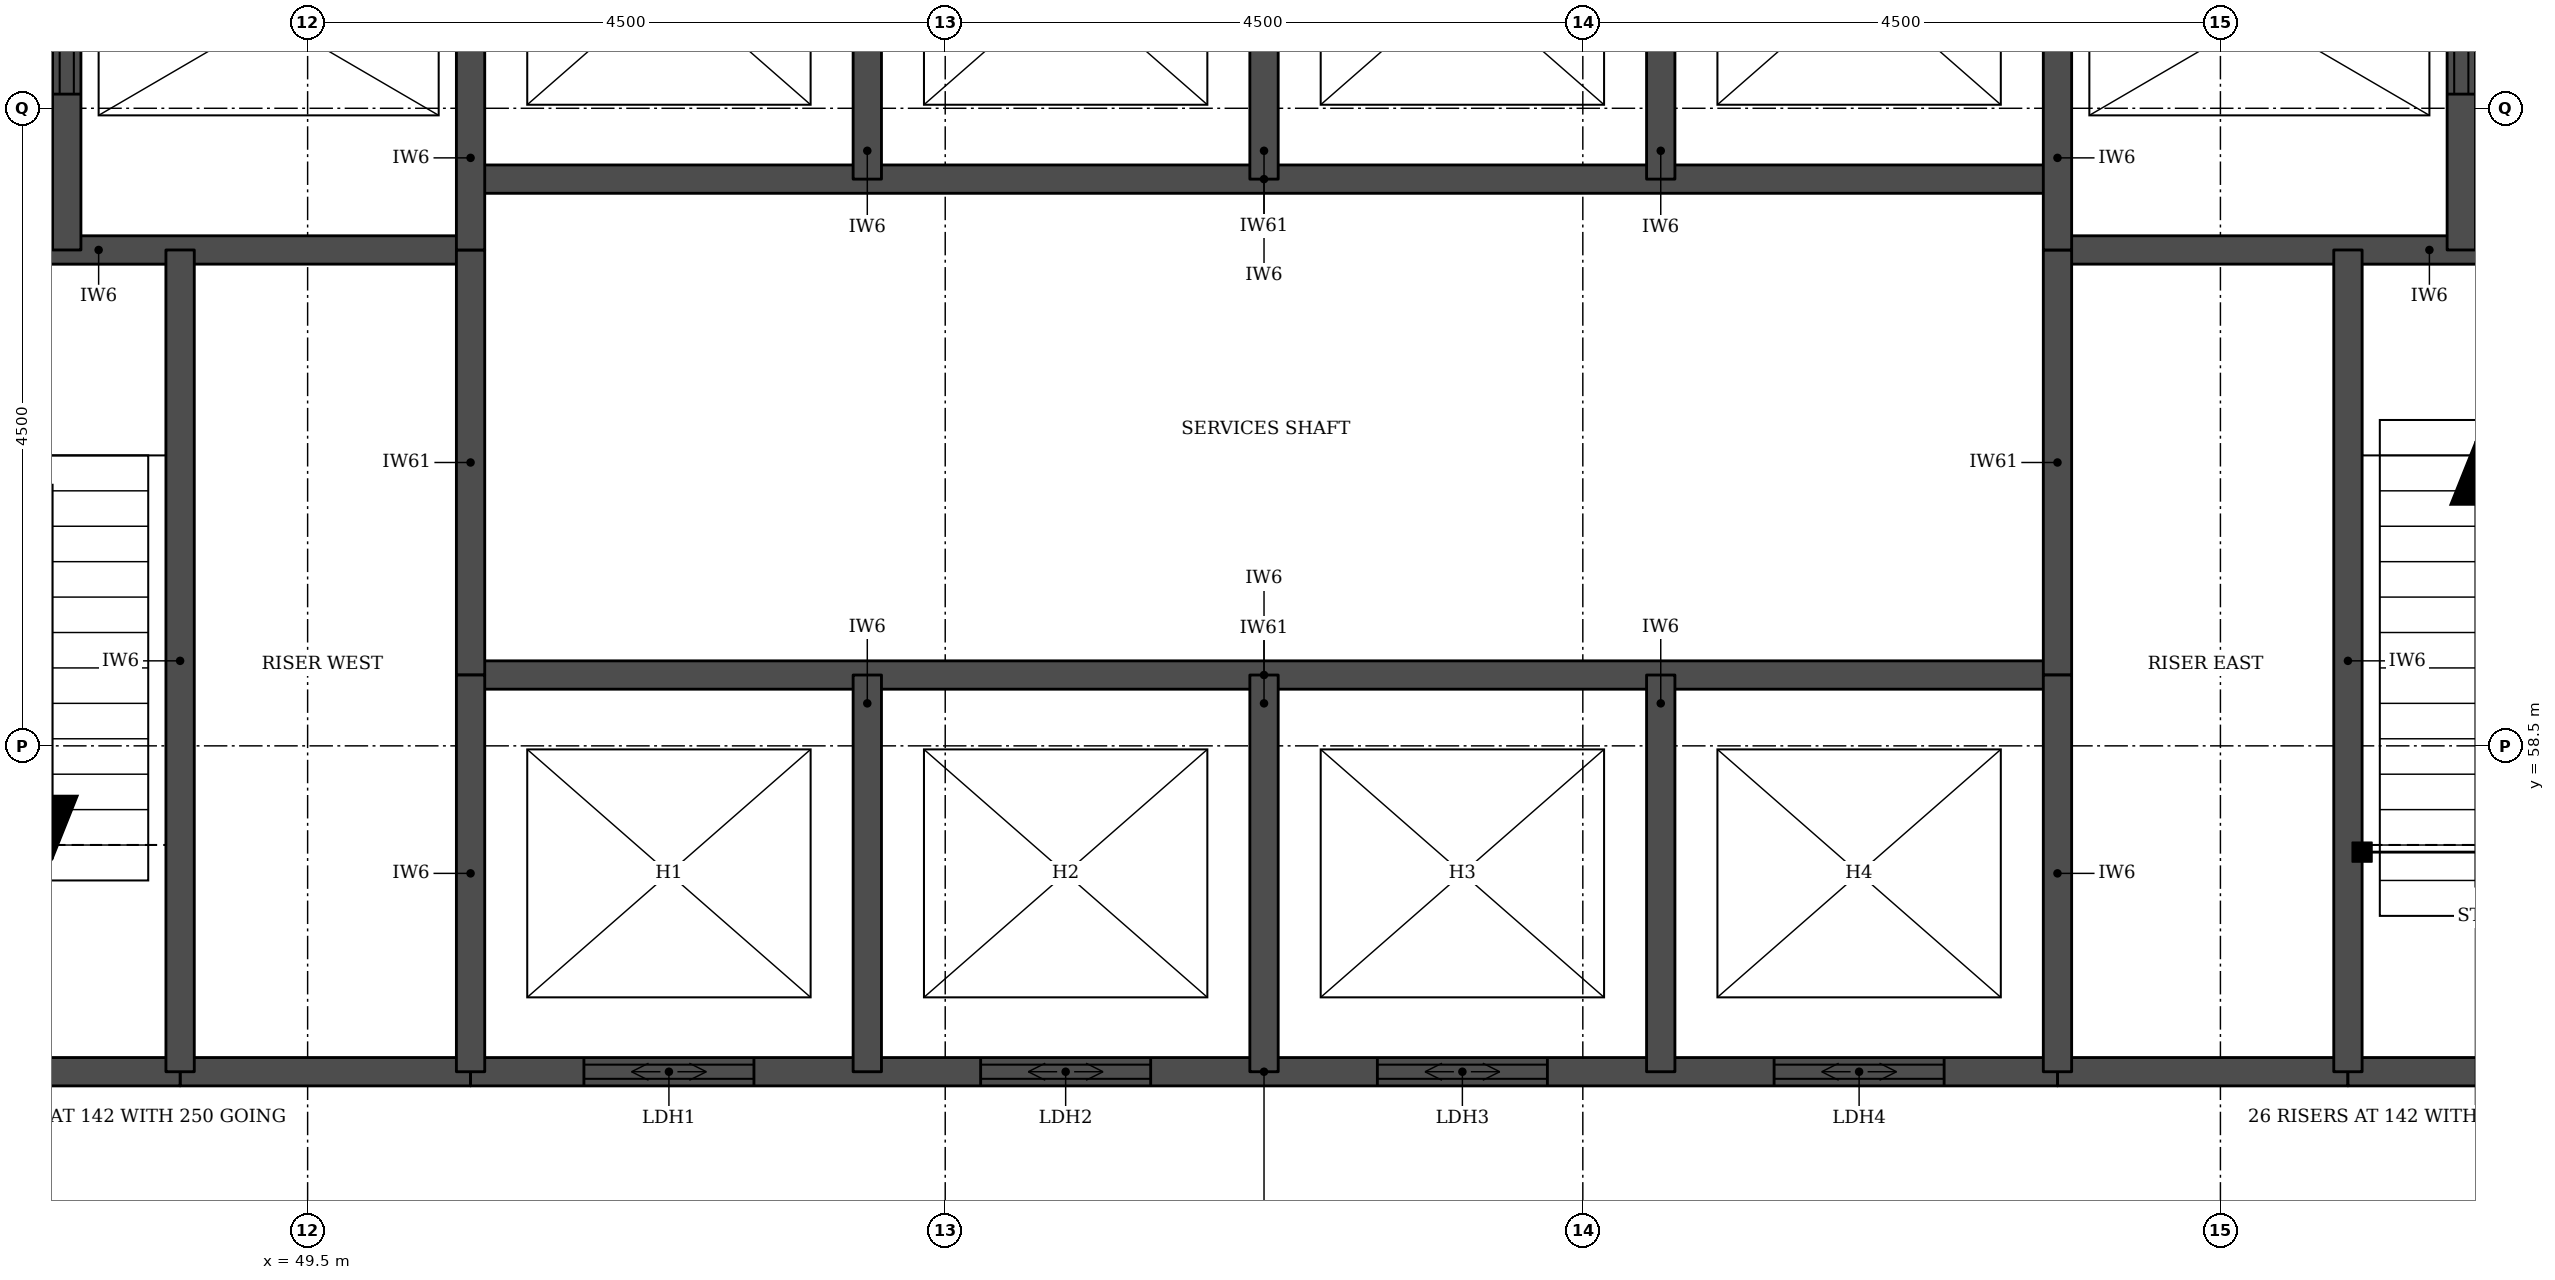
"""IFC4 building model, lengths in metres.
Left out: names, types, materials, properties, quantities, classifications, styles, units other than length and angle.
Written with IfcOpenShell. Run it as: python <this file> out.ifc"""

import sys

from ifc_helpers import new_model, si_unit, direction, frame, frame_2d, origin, place, context, subcontext, project, spatial, rectangle, extrude, element, fill, save


model = new_model("IFC4")
c1 = context("Model", 3, precision=1e-05, world=origin(), true_north=direction((0.0, 1.0)))
c2 = subcontext(c1, "Body", "Model", "MODEL_VIEW")
j1 = project(units=[si_unit("LENGTHUNIT", "METRE"), si_unit("PLANEANGLEUNIT", "RADIAN")], contexts=[c1])
p1 = place(None, origin())
s1 = spatial("IfcSite", under=j1, at=p1, CompositionType="ELEMENT")
p2 = place(p1, origin())
s2 = spatial("IfcBuilding", under=s1, at=p2, CompositionType="ELEMENT")
p3 = place(p2, frame((0.0, 0.0, 188.4)))
s3 = spatial("IfcBuildingStorey", under=s2, at=p3, CompositionType="ELEMENT", Elevation=188.4)
for number, where, z_axis, x_axis in (
    (1, (48.6, 56.2, 0.0), (0.0, 0.0, 1.0), (1.0, 0.0, 0.0)),
    (2, (61.85, 56.2, 0.0), (0.0, 0.0, 1.0), (1.0, 0.0, 0.0)),
):
    element("IfcWall", number, at=place(p3, frame(where, z_axis=z_axis, x_axis=x_axis)), inside=s3, PredefinedType="SOLIDWALL", context=c2, shape_type="SweptSolid", body=[
        extrude(rectangle(XDim=2.05, YDim=0.2, at=frame_2d((1.025, 0.0))), origin(), (0.0, 0.0, 1.0), 3.55),
    ])
p4 = place(p3, frame((45.4, 56.2, 0.0), z_axis=(0.0, 0.0, 1.0), x_axis=(1.0, 0.0, 0.0)))
e3 = element("IfcWall", 3, at=p4, inside=s3, PredefinedType="SOLIDWALL", context=c2, shape_type="SweptSolid", body=[
    extrude(rectangle(XDim=3.2, YDim=0.2, at=frame_2d((1.6, 0.0))), origin(), (0.0, 0.0, 1.0), 3.55),
])
p5 = place(p3, frame((50.65, 56.2, 0.0), z_axis=(0.0, 0.0, 1.0), x_axis=(1.0, 0.0, 0.0)))
e4 = element("IfcWall", 4, at=p5, inside=s3, PredefinedType="SOLIDWALL", context=c2, shape_type="SweptSolid", body=[
    extrude(rectangle(XDim=11.2, YDim=0.2, at=frame_2d((5.6, 0.0))), origin(), (0.0, 0.0, 1.0), 3.55),
])
p6 = place(p5, frame((0.8, 0.0, 0.0)))
e5 = element("IfcOpeningElement", 5, at=p6, cuts=e4, PredefinedType="OPENING", context=c2, shape_type="SweptSolid", body=[
    extrude(rectangle(XDim=1.2, YDim=2.1, at=frame_2d((0.6, 1.05))), frame((0.0, 0.11, 0.0), z_axis=(0.0, -1.0, 0.0), x_axis=(1.0, 0.0, 0.0)), (0.0, 0.0, 1.0), 0.22),
])
p7 = place(p5, frame((3.6, 0.0, 0.0)))
e6 = element("IfcOpeningElement", 6, at=p7, cuts=e4, PredefinedType="OPENING", context=c2, shape_type="SweptSolid", body=[
    extrude(rectangle(XDim=1.2, YDim=2.1, at=frame_2d((0.6, 1.05))), frame((0.0, 0.11, 0.0), z_axis=(0.0, -1.0, 0.0), x_axis=(1.0, 0.0, 0.0)), (0.0, 0.0, 1.0), 0.22),
])
p8 = place(p5, frame((6.4, 0.0, 0.0)))
e7 = element("IfcOpeningElement", 7, at=p8, cuts=e4, PredefinedType="OPENING", context=c2, shape_type="SweptSolid", body=[
    extrude(rectangle(XDim=1.2, YDim=2.1, at=frame_2d((0.6, 1.05))), frame((0.0, 0.11, 0.0), z_axis=(0.0, -1.0, 0.0), x_axis=(1.0, 0.0, 0.0)), (0.0, 0.0, 1.0), 0.22),
])
p9 = place(p5, frame((9.2, 0.0, 0.0)))
e8 = element("IfcOpeningElement", 8, at=p9, cuts=e4, PredefinedType="OPENING", context=c2, shape_type="SweptSolid", body=[
    extrude(rectangle(XDim=1.2, YDim=2.1, at=frame_2d((0.6, 1.05))), frame((0.0, 0.11, 0.0), z_axis=(0.0, -1.0, 0.0), x_axis=(1.0, 0.0, 0.0)), (0.0, 0.0, 1.0), 0.22),
])
p10 = place(p3, frame((63.9, 56.2, 0.0), z_axis=(0.0, 0.0, 1.0), x_axis=(1.0, 0.0, 0.0)))
e9 = element("IfcWall", 9, at=p10, inside=s3, PredefinedType="SOLIDWALL", context=c2, shape_type="SweptSolid", body=[
    extrude(rectangle(XDim=3.2, YDim=0.2, at=frame_2d((1.6, 0.0))), origin(), (0.0, 0.0, 1.0), 3.55),
])
p11 = place(p3, frame((50.65, 59.0, 0.0), z_axis=(0.0, 0.0, 1.0), x_axis=(1.0, 0.0, 0.0)))
e10 = element("IfcWall", 10, at=p11, inside=s3, PredefinedType="SOLIDWALL", context=c2, shape_type="SweptSolid", body=[
    extrude(rectangle(XDim=11.2, YDim=0.2, at=frame_2d((5.6, 0.0))), origin(), (0.0, 0.0, 1.0), 3.7),
])
for number, where, z_axis, x_axis in (
    (11, (45.4, 62.0, 0.0), (0.0, 0.0, 1.0), (1.0, 0.0, 0.0)),
    (12, (61.85, 62.0, 0.0), (0.0, 0.0, 1.0), (1.0, 0.0, 0.0)),
):
    element("IfcWall", number, at=place(p3, frame(where, z_axis=z_axis, x_axis=x_axis)), inside=s3, PredefinedType="SOLIDWALL", context=c2, shape_type="SweptSolid", body=[
        extrude(rectangle(XDim=5.25, YDim=0.2, at=frame_2d((2.625, 0.0))), origin(), (0.0, 0.0, 1.0), 3.55),
    ])
p12 = place(p3, frame((50.65, 62.5, 0.0), z_axis=(0.0, 0.0, 1.0), x_axis=(1.0, 0.0, 0.0)))
e13 = element("IfcWall", 13, at=p12, inside=s3, PredefinedType="SOLIDWALL", context=c2, shape_type="SweptSolid", body=[
    extrude(rectangle(XDim=11.2, YDim=0.2, at=frame_2d((5.6, 0.0))), origin(), (0.0, 0.0, 1.0), 3.7),
])
p13 = place(p3, frame((47.8, 62.0, 0.0), z_axis=(0.0, 0.0, 1.0), x_axis=(0.0, 1.0, 0.0)))
e14 = element("IfcWall", 14, at=p13, inside=s3, PredefinedType="SOLIDWALL", context=c2, shape_type="SweptSolid", body=[
    extrude(rectangle(XDim=3.3, YDim=0.2, at=frame_2d((1.65, 0.0))), origin(), (0.0, 0.0, 1.0), 3.55),
])
p14 = place(p13, frame((1.1, 0.0, 0.0)))
e15 = element("IfcOpeningElement", 15, at=p14, cuts=e14, PredefinedType="OPENING", context=c2, shape_type="SweptSolid", body=[
    extrude(rectangle(XDim=1.1, YDim=2.1, at=frame_2d((0.55, 1.05))), frame((0.0, 0.11, 0.0), z_axis=(0.0, -1.0, 0.0), x_axis=(1.0, 0.0, 0.0)), (0.0, 0.0, 1.0), 0.22),
])
p15 = place(p3, frame((48.6, 56.2, 0.0), z_axis=(0.0, 0.0, 1.0), x_axis=(0.0, 1.0, 0.0)))
e16 = element("IfcWall", 16, at=p15, inside=s3, PredefinedType="SOLIDWALL", context=c2, shape_type="SweptSolid", body=[
    extrude(rectangle(XDim=5.8, YDim=0.2, at=frame_2d((2.9, 0.0))), origin(), (0.0, 0.0, 1.0), 3.55),
])
p16 = place(p3, frame((50.65, 59.0, 0.0), z_axis=(0.0, 0.0, 1.0), x_axis=(0.0, 1.0, 0.0)))
e17 = element("IfcWall", 17, at=p16, inside=s3, PredefinedType="SOLIDWALL", context=c2, shape_type="SweptSolid", body=[
    extrude(rectangle(XDim=3.0, YDim=0.2, at=frame_2d((1.5, 0.0))), origin(), (0.0, 0.0, 1.0), 3.7),
])
p17 = place(p3, frame((50.65, 56.2, 0.0), z_axis=(0.0, 0.0, 1.0), x_axis=(0.0, 1.0, 0.0)))
e18 = element("IfcWall", 18, at=p17, inside=s3, PredefinedType="SOLIDWALL", context=c2, shape_type="SweptSolid", body=[
    extrude(rectangle(XDim=2.8, YDim=0.2, at=frame_2d((1.4, 0.0))), origin(), (0.0, 0.0, 1.0), 3.55),
])
p18 = place(p3, frame((50.65, 62.0, 0.0), z_axis=(0.0, 0.0, 1.0), x_axis=(0.0, 1.0, 0.0)))
e19 = element("IfcWall", 19, at=p18, inside=s3, PredefinedType="SOLIDWALL", context=c2, shape_type="SweptSolid", body=[
    extrude(rectangle(XDim=3.3, YDim=0.2, at=frame_2d((1.65, 0.0))), origin(), (0.0, 0.0, 1.0), 3.55),
])
for number, where, z_axis, x_axis in (
    (20, (53.45, 56.2, 0.0), (0.0, 0.0, 1.0), (0.0, 1.0, 0.0)),
    (21, (53.45, 62.5, 0.0), (0.0, 0.0, 1.0), (0.0, 1.0, 0.0)),
    (22, (56.25, 56.2, 0.0), (0.0, 0.0, 1.0), (0.0, 1.0, 0.0)),
    (23, (56.25, 62.5, 0.0), (0.0, 0.0, 1.0), (0.0, 1.0, 0.0)),
    (24, (59.05, 56.2, 0.0), (0.0, 0.0, 1.0), (0.0, 1.0, 0.0)),
    (25, (59.05, 62.5, 0.0), (0.0, 0.0, 1.0), (0.0, 1.0, 0.0)),
):
    element("IfcWall", number, at=place(p3, frame(where, z_axis=z_axis, x_axis=x_axis)), inside=s3, PredefinedType="SOLIDWALL", context=c2, shape_type="SweptSolid", body=[
        extrude(rectangle(XDim=2.8, YDim=0.2, at=frame_2d((1.4, 0.0))), origin(), (0.0, 0.0, 1.0), 3.55),
    ])
p19 = place(p3, frame((61.85, 59.0, 0.0), z_axis=(0.0, 0.0, 1.0), x_axis=(0.0, 1.0, 0.0)))
e26 = element("IfcWall", 26, at=p19, inside=s3, PredefinedType="SOLIDWALL", context=c2, shape_type="SweptSolid", body=[
    extrude(rectangle(XDim=3.0, YDim=0.2, at=frame_2d((1.5, 0.0))), origin(), (0.0, 0.0, 1.0), 3.7),
])
p20 = place(p3, frame((61.85, 56.2, 0.0), z_axis=(0.0, 0.0, 1.0), x_axis=(0.0, 1.0, 0.0)))
e27 = element("IfcWall", 27, at=p20, inside=s3, PredefinedType="SOLIDWALL", context=c2, shape_type="SweptSolid", body=[
    extrude(rectangle(XDim=2.8, YDim=0.2, at=frame_2d((1.4, 0.0))), origin(), (0.0, 0.0, 1.0), 3.55),
])
p21 = place(p3, frame((61.85, 62.0, 0.0), z_axis=(0.0, 0.0, 1.0), x_axis=(0.0, 1.0, 0.0)))
e28 = element("IfcWall", 28, at=p21, inside=s3, PredefinedType="SOLIDWALL", context=c2, shape_type="SweptSolid", body=[
    extrude(rectangle(XDim=3.3, YDim=0.2, at=frame_2d((1.65, 0.0))), origin(), (0.0, 0.0, 1.0), 3.55),
])
p22 = place(p3, frame((63.9, 56.2, 0.0), z_axis=(0.0, 0.0, 1.0), x_axis=(0.0, 1.0, 0.0)))
e29 = element("IfcWall", 29, at=p22, inside=s3, PredefinedType="SOLIDWALL", context=c2, shape_type="SweptSolid", body=[
    extrude(rectangle(XDim=5.8, YDim=0.2, at=frame_2d((2.9, 0.0))), origin(), (0.0, 0.0, 1.0), 3.55),
])
p23 = place(p3, frame((64.7, 62.0, 0.0), z_axis=(0.0, 0.0, 1.0), x_axis=(0.0, 1.0, 0.0)))
e30 = element("IfcWall", 30, at=p23, inside=s3, PredefinedType="SOLIDWALL", context=c2, shape_type="SweptSolid", body=[
    extrude(rectangle(XDim=3.3, YDim=0.2, at=frame_2d((1.65, 0.0))), origin(), (0.0, 0.0, 1.0), 3.55),
])
p24 = place(p23, frame((1.1, 0.0, 0.0)))
e31 = element("IfcOpeningElement", 31, at=p24, cuts=e30, PredefinedType="OPENING", context=c2, shape_type="SweptSolid", body=[
    extrude(rectangle(XDim=1.1, YDim=2.1, at=frame_2d((0.55, 1.05))), frame((0.0, 0.11, 0.0), z_axis=(0.0, -1.0, 0.0), x_axis=(1.0, 0.0, 0.0)), (0.0, 0.0, 1.0), 0.22),
])
p25 = place(p6, origin())
e32 = element("IfcDoor", 32, at=p25, inside=s3, OperationType="DOUBLE_DOOR_SLIDING", PredefinedType="DOOR", context=c2, shape_type="SweptSolid", body=[
    extrude(rectangle(XDim=1.2, YDim=2.1, at=frame_2d((0.6, 1.05))), frame((0.0, 0.025, 0.0), z_axis=(0.0, -1.0, 0.0), x_axis=(1.0, 0.0, 0.0)), (0.0, 0.0, 1.0), 0.05),
])
fill(e5, e32)
p26 = place(p7, origin())
e33 = element("IfcDoor", 33, at=p26, inside=s3, OperationType="DOUBLE_DOOR_SLIDING", PredefinedType="DOOR", context=c2, shape_type="SweptSolid", body=[
    extrude(rectangle(XDim=1.2, YDim=2.1, at=frame_2d((0.6, 1.05))), frame((0.0, 0.025, 0.0), z_axis=(0.0, -1.0, 0.0), x_axis=(1.0, 0.0, 0.0)), (0.0, 0.0, 1.0), 0.05),
])
fill(e6, e33)
p27 = place(p8, origin())
e34 = element("IfcDoor", 34, at=p27, inside=s3, OperationType="DOUBLE_DOOR_SLIDING", PredefinedType="DOOR", context=c2, shape_type="SweptSolid", body=[
    extrude(rectangle(XDim=1.2, YDim=2.1, at=frame_2d((0.6, 1.05))), frame((0.0, 0.025, 0.0), z_axis=(0.0, -1.0, 0.0), x_axis=(1.0, 0.0, 0.0)), (0.0, 0.0, 1.0), 0.05),
])
fill(e7, e34)
p28 = place(p9, origin())
e35 = element("IfcDoor", 35, at=p28, inside=s3, OperationType="DOUBLE_DOOR_SLIDING", PredefinedType="DOOR", context=c2, shape_type="SweptSolid", body=[
    extrude(rectangle(XDim=1.2, YDim=2.1, at=frame_2d((0.6, 1.05))), frame((0.0, 0.025, 0.0), z_axis=(0.0, -1.0, 0.0), x_axis=(1.0, 0.0, 0.0)), (0.0, 0.0, 1.0), 0.05),
])
fill(e8, e35)
p29 = place(p14, origin())
e36 = element("IfcDoor", 36, at=p29, inside=s3, OperationType="DOUBLE_DOOR_SLIDING", PredefinedType="DOOR", context=c2, shape_type="SweptSolid", body=[
    extrude(rectangle(XDim=1.1, YDim=2.1, at=frame_2d((0.55, 1.05))), frame((0.0, 0.025, 0.0), z_axis=(0.0, -1.0, 0.0), x_axis=(1.0, 0.0, 0.0)), (0.0, 0.0, 1.0), 0.05),
])
fill(e15, e36)
p30 = place(p24, origin())
e37 = element("IfcDoor", 37, at=p30, inside=s3, OperationType="DOUBLE_DOOR_SLIDING", PredefinedType="DOOR", context=c2, shape_type="SweptSolid", body=[
    extrude(rectangle(XDim=1.1, YDim=2.1, at=frame_2d((0.55, 1.05))), frame((0.0, 0.025, 0.0), z_axis=(0.0, -1.0, 0.0), x_axis=(1.0, 0.0, 0.0)), (0.0, 0.0, 1.0), 0.05),
])
fill(e31, e37)
save(model, sys.argv[1])
